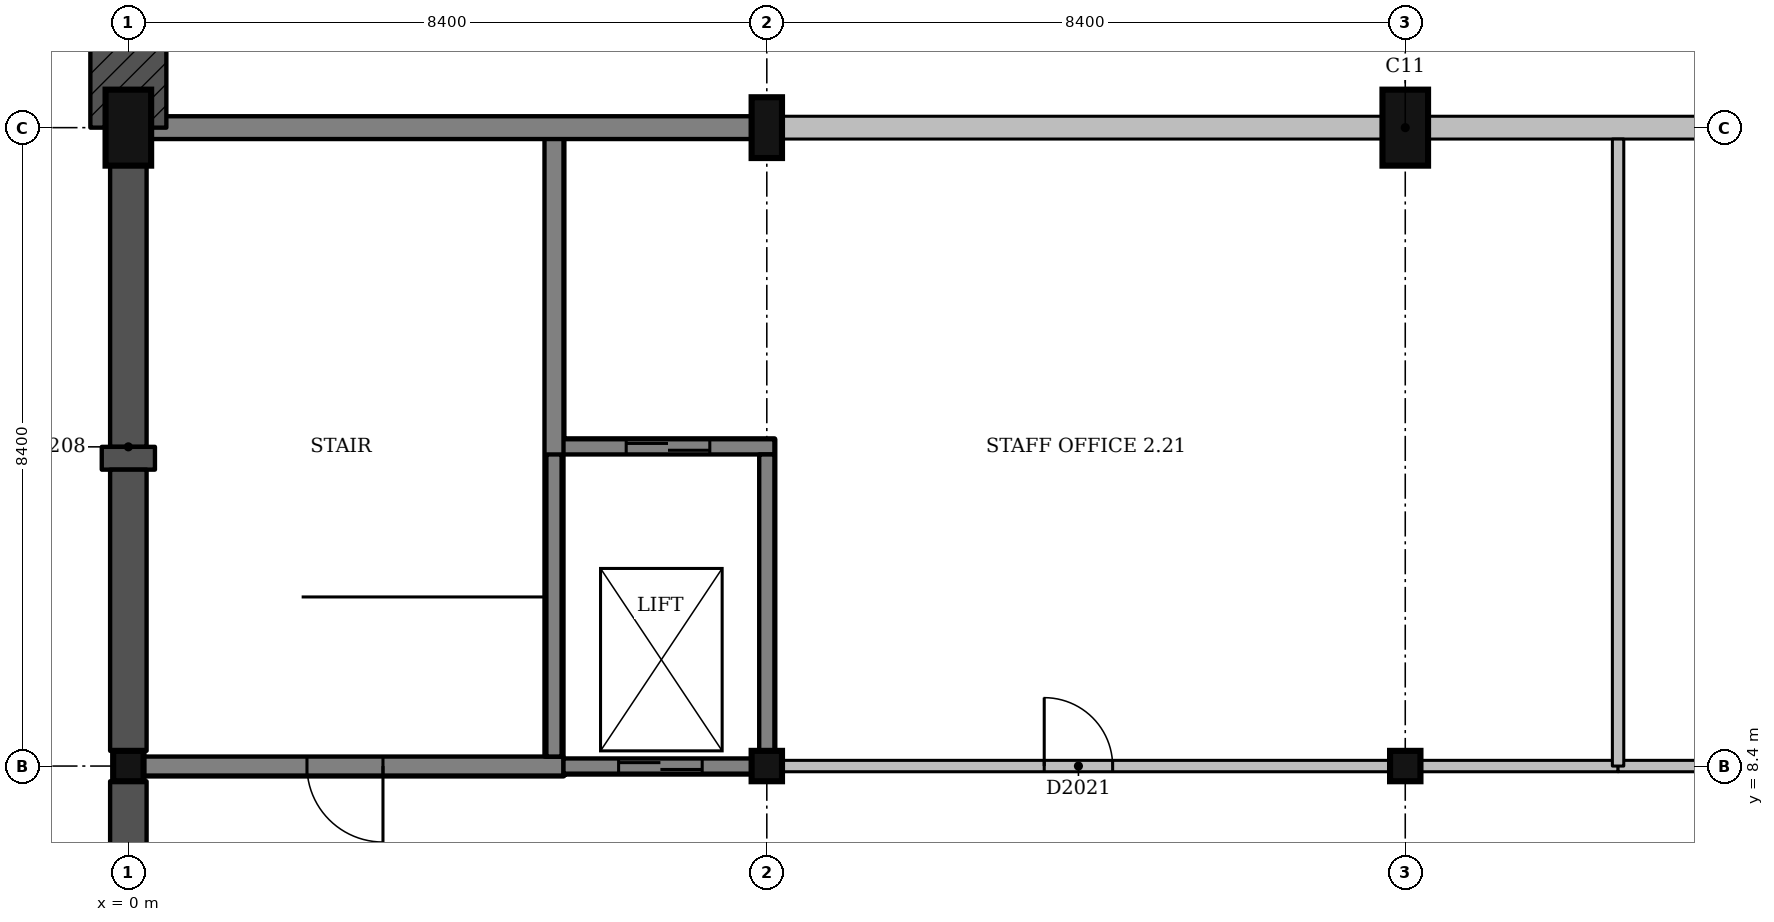
"""IFC4 building model, lengths in metres.
Left out: names, types, materials, properties, quantities, classifications, styles, units other than length and angle.
Written with IfcOpenShell. Run it as: python <this file> out.ifc"""

import sys

from ifc_helpers import new_model, si_unit, direction, frame, frame_2d, origin, origin_2d, place, context, subcontext, project, spatial, polyline, rectangle, outline, extrude, element, fill, save


model = new_model("IFC4")
c1 = context("Model", 3, precision=1e-05, world=origin(), true_north=direction((0.0, 1.0)))
c2 = subcontext(c1, "Body", "Model", "MODEL_VIEW")
j1 = project(units=[si_unit("LENGTHUNIT", "METRE"), si_unit("PLANEANGLEUNIT", "RADIAN")], contexts=[c1])
p1 = place(None, origin())
s1 = spatial("IfcSite", under=j1, at=p1, CompositionType="ELEMENT")
p2 = place(p1, origin())
s2 = spatial("IfcBuilding", under=s1, at=p2, CompositionType="ELEMENT")
p3 = place(p2, frame((0.0, 0.0, 9.0)))
s3 = spatial("IfcBuildingStorey", under=s2, at=p3, CompositionType="ELEMENT", Elevation=9.0)
p4 = place(p3, frame((0.0, 8.4, 0.0), z_axis=(0.0, 0.0, 1.0), x_axis=(1.0, 0.0, 0.0)))
e1 = element("IfcColumn", 1, at=p4, inside=s3, PredefinedType="COLUMN", context=c2, shape_type="SweptSolid", body=[
    extrude(rectangle(XDim=0.4, YDim=0.4, at=origin_2d()), origin(), (0.0, 0.0, 1.0), 4.5),
])
p5 = place(p3, frame((0.0, 16.8, 0.0), z_axis=(0.0, 0.0, 1.0), x_axis=(1.0, 0.0, 0.0)))
e2 = element("IfcColumn", 2, at=p5, inside=s3, PredefinedType="COLUMN", context=c2, shape_type="SweptSolid", body=[
    extrude(rectangle(XDim=0.6, YDim=1.0, at=origin_2d()), origin(), (0.0, 0.0, 1.0), 4.5),
])
p6 = place(p3, frame((8.4, 8.4, 0.0), z_axis=(0.0, 0.0, 1.0), x_axis=(1.0, 0.0, 0.0)))
e3 = element("IfcColumn", 3, at=p6, inside=s3, PredefinedType="COLUMN", context=c2, shape_type="SweptSolid", body=[
    extrude(rectangle(XDim=0.4, YDim=0.4, at=origin_2d()), origin(), (0.0, 0.0, 1.0), 4.5),
])
p7 = place(p3, frame((8.4, 16.8, 0.0), z_axis=(0.0, 0.0, 1.0), x_axis=(1.0, 0.0, 0.0)))
e4 = element("IfcColumn", 4, at=p7, inside=s3, PredefinedType="COLUMN", context=c2, shape_type="SweptSolid", body=[
    extrude(rectangle(XDim=0.4, YDim=0.8, at=origin_2d()), origin(), (0.0, 0.0, 1.0), 4.5),
])
p8 = place(p3, frame((16.8, 8.4, 0.0), z_axis=(0.0, 0.0, 1.0), x_axis=(1.0, 0.0, 0.0)))
e5 = element("IfcColumn", 5, at=p8, inside=s3, PredefinedType="COLUMN", context=c2, shape_type="SweptSolid", body=[
    extrude(rectangle(XDim=0.4, YDim=0.4, at=origin_2d()), origin(), (0.0, 0.0, 1.0), 4.5),
])
p9 = place(p3, frame((16.8, 16.8, 0.0), z_axis=(0.0, 0.0, 1.0), x_axis=(1.0, 0.0, 0.0)))
e6 = element("IfcColumn", 6, at=p9, inside=s3, PredefinedType="COLUMN", context=c2, shape_type="SweptSolid", body=[
    extrude(rectangle(XDim=0.6, YDim=1.0, at=origin_2d()), origin(), (0.0, 0.0, 1.0), 4.5),
])
p10 = place(p3, frame((5.5, 12.6, 0.0), z_axis=(0.0, 0.0, 1.0), x_axis=(1.0, 0.0, 0.0)))
e7 = element("IfcWall", 7, at=p10, inside=s3, PredefinedType="SHEAR", context=c2, shape_type="SweptSolid", body=[
    extrude(rectangle(XDim=3.0, YDim=0.2, at=frame_2d((1.5, 0.0))), origin(), (0.0, 0.0, 1.0), 4.5),
])
p11 = place(p10, frame((1.05, 0.0, 0.0)))
e8 = element("IfcOpeningElement", 8, at=p11, cuts=e7, PredefinedType="OPENING", context=c2, shape_type="SweptSolid", body=[
    extrude(rectangle(XDim=1.1, YDim=2.1, at=frame_2d((0.55, 1.05))), frame((0.0, 0.11, 0.0), z_axis=(0.0, -1.0, 0.0), x_axis=(1.0, 0.0, 0.0)), (0.0, 0.0, 1.0), 0.22),
])
p12 = place(p3, frame((8.4, 8.6, 0.0), z_axis=(0.0, 0.0, 1.0), x_axis=(0.0, 1.0, 0.0)))
e9 = element("IfcWall", 9, at=p12, inside=s3, PredefinedType="SHEAR", context=c2, shape_type="SweptSolid", body=[
    extrude(rectangle(XDim=3.9, YDim=0.2, at=frame_2d((1.95, 0.0))), origin(), (0.0, 0.0, 1.0), 4.5),
])
p13 = place(p3, frame((0.2, 8.4, 0.0), z_axis=(0.0, 0.0, 1.0), x_axis=(1.0, 0.0, 0.0)))
e10 = element("IfcWall", 10, at=p13, inside=s3, PredefinedType="SHEAR", context=c2, shape_type="SweptSolid", body=[
    extrude(rectangle(XDim=5.525, YDim=0.25, at=frame_2d((2.763, 0.0))), origin(), (0.0, 0.0, 1.0), 4.2),
])
p14 = place(p13, frame((2.15, 0.0, 0.0)))
e11 = element("IfcOpeningElement", 11, at=p14, cuts=e10, PredefinedType="OPENING", context=c2, shape_type="SweptSolid", body=[
    extrude(rectangle(XDim=1.0, YDim=2.1, at=frame_2d((0.5, 1.05))), frame((0.0, 0.135, 0.0), z_axis=(0.0, -1.0, 0.0), x_axis=(1.0, 0.0, 0.0)), (0.0, 0.0, 1.0), 0.27),
])
p15 = place(p3, frame((5.6, 8.525, 0.0), z_axis=(0.0, 0.0, 1.0), x_axis=(0.0, 1.0, 0.0)))
e12 = element("IfcWall", 12, at=p15, inside=s3, PredefinedType="SHEAR", context=c2, shape_type="SweptSolid", body=[
    extrude(rectangle(XDim=8.15, YDim=0.25, at=frame_2d((4.075, 0.0))), origin(), (0.0, 0.0, 1.0), 4.2),
])
p16 = place(p3, frame((0.0, 16.8, 2.0), z_axis=(0.0, 0.0, 1.0), x_axis=(0.0, 1.0, 0.0)))
e13 = element("IfcWall", 13, at=p16, inside=s3, PredefinedType="SOLIDWALL", context=c2, shape_type="SweptSolid", body=[
    extrude(outline(polyline([(0.0, 0.0), (33.6, 0.0), (33.6, 16.5), (31.5, 15.753), (29.4, 15.115), (27.3, 14.583), (25.2, 14.152), (23.1, 13.819), (21.0, 13.583), (18.9, 13.442), (16.8, 13.395), (14.7, 13.442), (12.6, 13.583), (10.5, 13.819), (8.4, 14.152), (6.3, 14.583), (4.2, 15.115), (2.1, 15.753), (0.0, 16.5), (0.0, 0.0)])), frame((0.0, 0.5, 0.0), z_axis=(0.0, -1.0, 0.0), x_axis=(1.0, 0.0, 0.0)), (0.0, 0.0, 1.0), 1.0),
])
for number, where, z_axis, x_axis in (
    (14, (25.0, 16.8, 0.0), (0.0, 0.0, 1.0), (-1.0, 0.0, 0.0)),
    (15, (16.5, 16.8, 0.0), (0.0, 0.0, 1.0), (-1.0, 0.0, 0.0)),
    (16, (8.2, 16.8, 0.0), (0.0, 0.0, 1.0), (-1.0, 0.0, 0.0)),
):
    element("IfcWall", number, at=place(p3, frame(where, z_axis=z_axis, x_axis=x_axis)), inside=s3, PredefinedType="SOLIDWALL", context=c2, shape_type="SweptSolid", body=[
        extrude(rectangle(XDim=7.9, YDim=0.3, at=frame_2d((3.95, 0.0))), origin(), (0.0, 0.0, 1.0), 3.6),
    ])
p17 = place(p3, frame((0.0, 16.3, 0.0), z_axis=(0.0, 0.0, 1.0), x_axis=(0.0, -1.0, 0.0)))
e17 = element("IfcWall", 17, at=p17, inside=s3, PredefinedType="SOLIDWALL", context=c2, shape_type="SweptSolid", body=[
    extrude(rectangle(XDim=3.7, YDim=0.48, at=frame_2d((1.85, 0.0))), origin(), (0.0, 0.0, 1.0), 4.2),
])
p18 = place(p3, frame((0.0, 12.6, 0.0), z_axis=(0.0, 0.0, 1.0), x_axis=(0.0, -1.0, 0.0)))
e18 = element("IfcWall", 18, at=p18, inside=s3, PredefinedType="SOLIDWALL", context=c2, shape_type="SweptSolid", body=[
    extrude(rectangle(XDim=0.3, YDim=0.7, at=frame_2d((0.15, 0.0))), origin(), (0.0, 0.0, 1.0), 4.2),
])
p19 = place(p3, frame((0.0, 12.3, 0.0), z_axis=(0.0, 0.0, 1.0), x_axis=(0.0, -1.0, 0.0)))
e19 = element("IfcWall", 19, at=p19, inside=s3, PredefinedType="SOLIDWALL", context=c2, shape_type="SweptSolid", body=[
    extrude(rectangle(XDim=3.7, YDim=0.48, at=frame_2d((1.85, 0.0))), origin(), (0.0, 0.0, 1.0), 4.2),
])
p20 = place(p3, frame((0.0, 8.2, 0.0), z_axis=(0.0, 0.0, 1.0), x_axis=(0.0, -1.0, 0.0)))
e20 = element("IfcWall", 20, at=p20, inside=s3, PredefinedType="SOLIDWALL", context=c2, shape_type="SweptSolid", body=[
    extrude(rectangle(XDim=3.85, YDim=0.48, at=frame_2d((1.925, 0.0))), origin(), (0.0, 0.0, 1.0), 3.6),
])
p21 = place(p3, frame((8.6, 8.4, 0.0), z_axis=(0.0, 0.0, 1.0), x_axis=(1.0, 0.0, 0.0)))
e21 = element("IfcWall", 21, at=p21, inside=s3, PredefinedType="PARTITIONING", context=c2, shape_type="SweptSolid", body=[
    extrude(rectangle(XDim=8.0, YDim=0.15, at=frame_2d((4.0, 0.0))), origin(), (0.0, 0.0, 1.0), 3.6),
])
p22 = place(p21, frame((3.45, 0.0, 0.0)))
e22 = element("IfcOpeningElement", 22, at=p22, cuts=e21, PredefinedType="OPENING", context=c2, shape_type="SweptSolid", body=[
    extrude(rectangle(XDim=0.9, YDim=2.1, at=frame_2d((0.45, 1.05))), frame((0.0, 0.085, 0.0), z_axis=(0.0, -1.0, 0.0), x_axis=(1.0, 0.0, 0.0)), (0.0, 0.0, 1.0), 0.17),
])
p23 = place(p3, frame((17.0, 8.4, 0.0), z_axis=(0.0, 0.0, 1.0), x_axis=(1.0, 0.0, 0.0)))
e23 = element("IfcWall", 23, at=p23, inside=s3, PredefinedType="PARTITIONING", context=c2, shape_type="SweptSolid", body=[
    extrude(rectangle(XDim=2.6, YDim=0.15, at=frame_2d((1.3, 0.0))), origin(), (0.0, 0.0, 1.0), 3.6),
])
p24 = place(p3, frame((19.6, 8.4, 0.0), z_axis=(0.0, 0.0, 1.0), x_axis=(1.0, 0.0, 0.0)))
e24 = element("IfcWall", 24, at=p24, inside=s3, PredefinedType="PARTITIONING", context=c2, shape_type="SweptSolid", body=[
    extrude(rectangle(XDim=5.4, YDim=0.15, at=frame_2d((2.7, 0.0))), origin(), (0.0, 0.0, 1.0), 3.6),
])
p25 = place(p3, frame((19.6, 8.4, 0.0), z_axis=(0.0, 0.0, 1.0), x_axis=(0.0, 1.0, 0.0)))
e25 = element("IfcWall", 25, at=p25, inside=s3, PredefinedType="PARTITIONING", context=c2, shape_type="SweptSolid", body=[
    extrude(rectangle(XDim=8.25, YDim=0.15, at=frame_2d((4.125, 0.0))), origin(), (0.0, 0.0, 1.0), 3.6),
])
p26 = place(p3, frame((5.725, 8.4, 0.0), z_axis=(0.0, 0.0, 1.0), x_axis=(1.0, 0.0, 0.0)))
e26 = element("IfcWall", 26, at=p26, inside=s3, PredefinedType="SHEAR", context=c2, shape_type="SweptSolid", body=[
    extrude(rectangle(XDim=2.475, YDim=0.2, at=frame_2d((1.237, 0.0))), origin(), (0.0, 0.0, 1.0), 4.5),
])
p27 = place(p26, frame((0.725, 0.0, 0.0)))
e27 = element("IfcOpeningElement", 27, at=p27, cuts=e26, PredefinedType="OPENING", context=c2, shape_type="SweptSolid", body=[
    extrude(rectangle(XDim=1.1, YDim=2.1, at=frame_2d((0.55, 1.05))), frame((0.0, 0.11, 0.0), z_axis=(0.0, -1.0, 0.0), x_axis=(1.0, 0.0, 0.0)), (0.0, 0.0, 1.0), 0.22),
])
p28 = place(p3, frame((5.6, 8.525, 4.2), z_axis=(0.0, 0.0, 1.0), x_axis=(0.0, 1.0, 0.0)))
e28 = element("IfcWall", 28, at=p28, inside=s3, PredefinedType="SHEAR", context=c2, shape_type="SweptSolid", body=[
    extrude(rectangle(XDim=3.975, YDim=0.2, at=frame_2d((1.988, 0.0))), origin(), (0.0, 0.0, 1.0), 0.3),
])
p29 = place(p22, origin())
e29 = element("IfcDoor", 29, at=p29, inside=s3, OperationType="SINGLE_SWING_LEFT", PredefinedType="DOOR", context=c2, shape_type="SweptSolid", body=[
    extrude(rectangle(XDim=0.9, YDim=2.1, at=frame_2d((0.45, 1.05))), frame((0.0, 0.025, 0.0), z_axis=(0.0, -1.0, 0.0), x_axis=(1.0, 0.0, 0.0)), (0.0, 0.0, 1.0), 0.05),
])
fill(e22, e29)
p30 = place(p14, origin())
e30 = element("IfcDoor", 30, at=p30, inside=s3, OperationType="SINGLE_SWING_RIGHT", PredefinedType="DOOR", context=c2, shape_type="SweptSolid", body=[
    extrude(rectangle(XDim=1.0, YDim=2.1, at=frame_2d((0.5, 1.05))), frame((0.0, 0.025, 0.0), z_axis=(0.0, -1.0, 0.0), x_axis=(1.0, 0.0, 0.0)), (0.0, 0.0, 1.0), 0.05),
])
fill(e11, e30)
p31 = place(p27, origin())
e31 = element("IfcDoor", 31, at=p31, inside=s3, OperationType="SLIDING_TO_RIGHT", PredefinedType="DOOR", context=c2, shape_type="SweptSolid", body=[
    extrude(rectangle(XDim=1.1, YDim=2.1, at=frame_2d((0.55, 1.05))), frame((0.0, 0.025, 0.0), z_axis=(0.0, -1.0, 0.0), x_axis=(1.0, 0.0, 0.0)), (0.0, 0.0, 1.0), 0.05),
])
fill(e27, e31)
p32 = place(p11, origin())
e32 = element("IfcDoor", 32, at=p32, inside=s3, OperationType="SLIDING_TO_LEFT", PredefinedType="DOOR", context=c2, shape_type="SweptSolid", body=[
    extrude(rectangle(XDim=1.1, YDim=2.1, at=frame_2d((0.55, 1.05))), frame((0.0, 0.025, 0.0), z_axis=(0.0, -1.0, 0.0), x_axis=(1.0, 0.0, 0.0)), (0.0, 0.0, 1.0), 0.05),
])
fill(e8, e32)
save(model, sys.argv[1])
